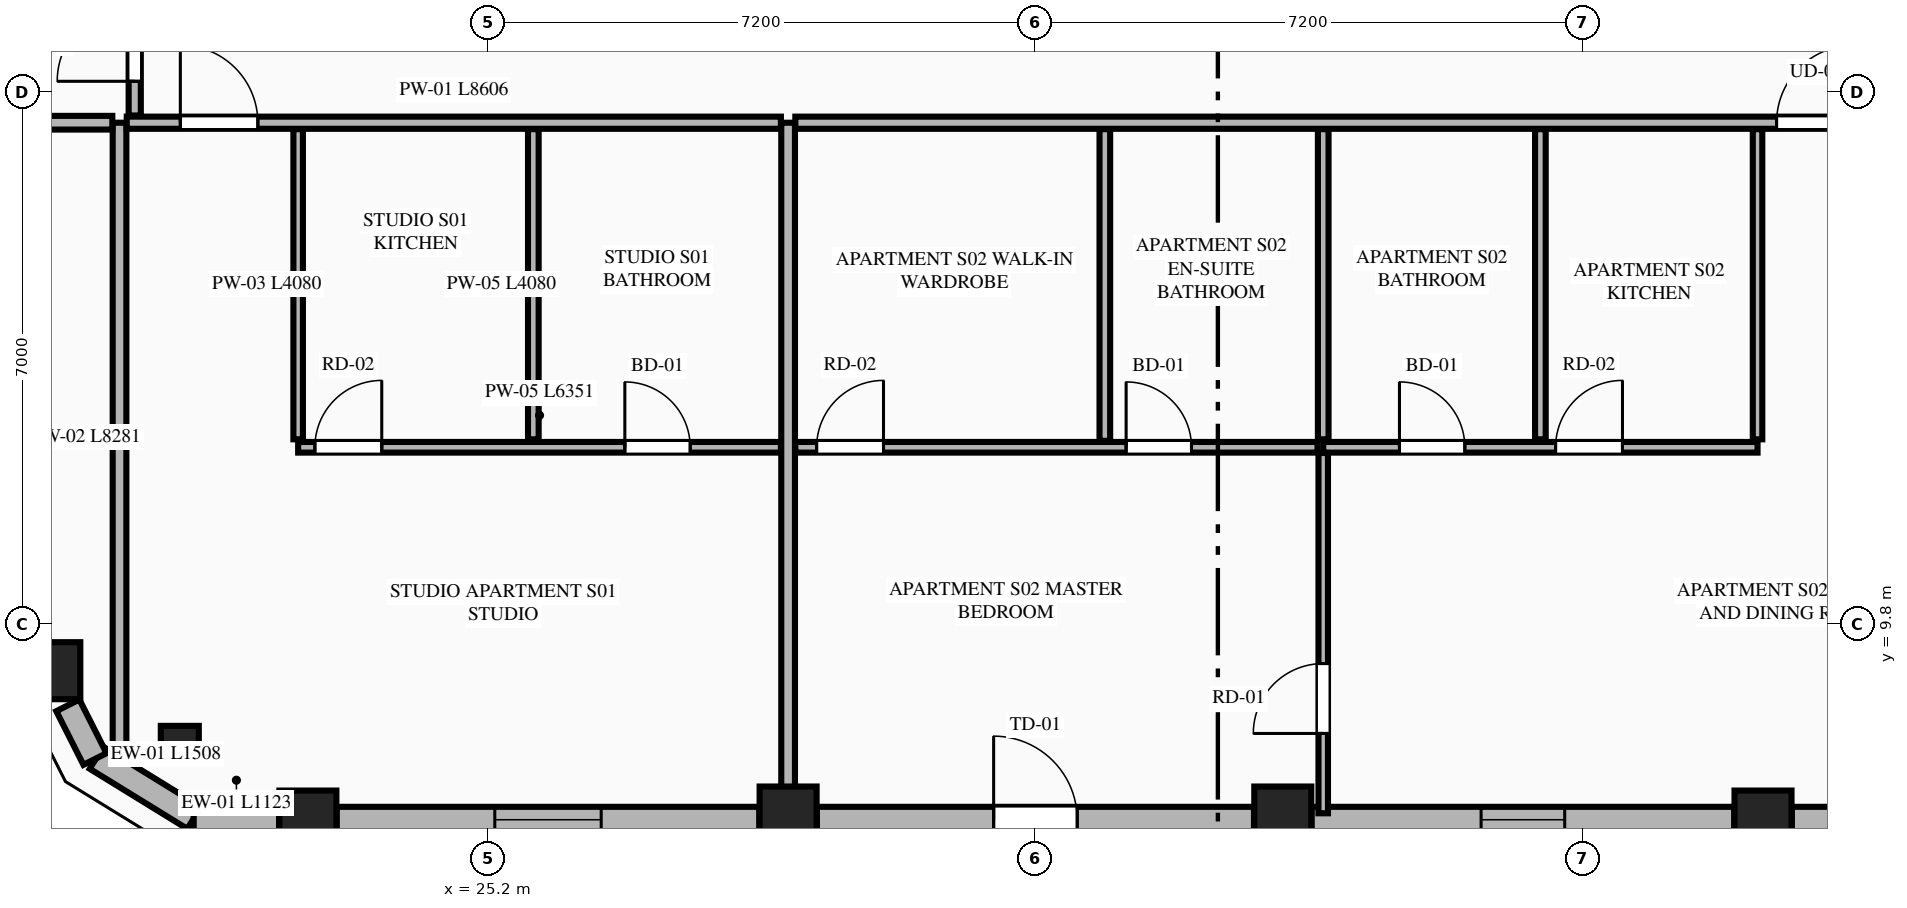
"""IFC4 building model, lengths in metres.
Left out: names, types, materials, properties, quantities, classifications, styles, units other than length and angle.
Written with IfcOpenShell. Run it as: python <this file> out.ifc"""

import sys

from ifc_helpers import new_model, si_unit, direction, frame, frame_2d, origin, origin_2d, place, context, subcontext, project, spatial, rectangle, extrude, element, fill, save


model = new_model("IFC4")
c1 = context("Model", 3, precision=1e-05, world=origin(), true_north=direction((0.0, 1.0)))
c2 = subcontext(c1, "Body", "Model", "MODEL_VIEW")
j1 = project(units=[si_unit("LENGTHUNIT", "METRE"), si_unit("PLANEANGLEUNIT", "RADIAN")], contexts=[c1])
p1 = place(None, origin())
s1 = spatial("IfcSite", under=j1, at=p1, CompositionType="ELEMENT")
p2 = place(p1, origin())
s2 = spatial("IfcBuilding", under=s1, at=p2, CompositionType="ELEMENT")
p3 = place(p2, frame((0.0, 0.0, 230.65)))
s3 = spatial("IfcBuildingStorey", under=s2, at=p3, CompositionType="ELEMENT", Elevation=230.65)
for number, where, z_axis, x_axis in (
    (1, (22.828, 7.239, 0.0), (0.0, 0.0, 1.0), (1.0, 0.0, 0.0)),
    (2, (29.146, 7.292, 0.0), (0.0, 0.0, 1.0), (1.0, 0.0, 0.0)),
    (3, (35.654, 7.292, 0.0), (0.0, 0.0, 1.0), (1.0, 0.0, 0.0)),
    (4, (41.972, 7.239, 0.0), (0.0, 0.0, 1.0), (1.0, 0.0, 0.0)),
    (5, (19.459, 9.191, 0.0), (0.0, 0.0, 1.0), (1.0, 0.0, 0.0)),
):
    element("IfcColumn", number, at=place(p3, frame(where, z_axis=z_axis, x_axis=x_axis)), inside=s3, PredefinedType="COLUMN", context=c2, shape_type="SweptSolid", body=[
        extrude(rectangle(XDim=0.75, YDim=0.75, at=origin_2d()), origin(), (0.0, 0.0, 1.0), 3.65),
    ])
p4 = place(p3, frame((21.143, 8.215, 0.0), z_axis=(0.0, 0.0, 1.0), x_axis=(0.865256437757, -0.501329529272, 0.0)))
e6 = element("IfcColumn", 6, at=p4, inside=s3, PredefinedType="PILASTER", context=c2, shape_type="SweptSolid", body=[
    extrude(rectangle(XDim=0.5, YDim=0.35, at=origin_2d()), origin(), (0.0, 0.0, 1.0), 3.65),
])
p5 = place(p3, frame((20.047, 8.045, 0.0), z_axis=(0.0, 0.0, 1.0), x_axis=(0.851680557619, -0.52406128246, 0.0)))
e7 = element("IfcWall", 7, at=p5, inside=s3, PredefinedType="STANDARD", context=c2, shape_type="SweptSolid", body=[
    extrude(rectangle(XDim=1.508, YDim=0.34, at=frame_2d((0.754, 0.0))), origin(), (0.0, 0.0, 1.0), 3.45),
])
p6 = place(p3, frame((21.326, 7.23, 0.0), z_axis=(0.0, 0.0, 1.0), x_axis=(1.0, 0.0, 0.0)))
e8 = element("IfcWall", 8, at=p6, inside=s3, PredefinedType="STANDARD", context=c2, shape_type="SweptSolid", body=[
    extrude(rectangle(XDim=1.123, YDim=0.34, at=frame_2d((0.562, 0.0))), origin(), (0.0, 0.0, 1.0), 3.45),
])
p7 = place(p3, frame((23.207, 7.23, 0.0), z_axis=(0.0, 0.0, 1.0), x_axis=(1.0, 0.0, 0.0)))
e9 = element("IfcWall", 9, at=p7, inside=s3, PredefinedType="STANDARD", context=c2, shape_type="SweptSolid", body=[
    extrude(rectangle(XDim=5.56, YDim=0.34, at=frame_2d((2.78, 0.0))), origin(), (0.0, 0.0, 1.0), 2.983),
])
p8 = place(p7, frame((2.08, 0.0, 0.75)))
e10 = element("IfcOpeningElement", 10, at=p8, cuts=e9, PredefinedType="OPENING", context=c2, shape_type="SweptSolid", body=[
    extrude(rectangle(XDim=1.4, YDim=2.05, at=frame_2d((0.7, 1.025))), frame((0.0, 0.18, 0.0), z_axis=(0.0, -1.0, 0.0), x_axis=(1.0, 0.0, 0.0)), (0.0, 0.0, 1.0), 0.36),
])
p9 = place(p3, frame((29.525, 7.23, 0.0), z_axis=(0.0, 0.0, 1.0), x_axis=(1.0, 0.0, 0.0)))
e11 = element("IfcWall", 11, at=p9, inside=s3, PredefinedType="STANDARD", context=c2, shape_type="SweptSolid", body=[
    extrude(rectangle(XDim=5.75, YDim=0.34, at=frame_2d((2.875, 0.0))), origin(), (0.0, 0.0, 1.0), 2.983),
])
p10 = place(p9, frame((2.325, 0.0, 0.0)))
e12 = element("IfcOpeningElement", 12, at=p10, cuts=e11, PredefinedType="OPENING", context=c2, shape_type="SweptSolid", body=[
    extrude(rectangle(XDim=1.1, YDim=2.25, at=frame_2d((0.55, 1.125))), frame((0.0, 0.18, 0.0), z_axis=(0.0, -1.0, 0.0), x_axis=(1.0, 0.0, 0.0)), (0.0, 0.0, 1.0), 0.36),
])
p11 = place(p3, frame((36.033, 7.23, 0.0), z_axis=(0.0, 0.0, 1.0), x_axis=(1.0, 0.0, 0.0)))
e13 = element("IfcWall", 13, at=p11, inside=s3, PredefinedType="STANDARD", context=c2, shape_type="SweptSolid", body=[
    extrude(rectangle(XDim=5.56, YDim=0.34, at=frame_2d((2.78, 0.0))), origin(), (0.0, 0.0, 1.0), 2.983),
])
p12 = place(p11, frame((2.23, 0.0, 0.75)))
e14 = element("IfcOpeningElement", 14, at=p12, cuts=e13, PredefinedType="OPENING", context=c2, shape_type="SweptSolid", body=[
    extrude(rectangle(XDim=1.1, YDim=2.0, at=frame_2d((0.55, 1.0))), frame((0.0, 0.18, 0.0), z_axis=(0.0, -1.0, 0.0), x_axis=(1.0, 0.0, 0.0)), (0.0, 0.0, 1.0), 0.36),
])
p13 = place(p3, frame((42.351, 7.23, 0.0), z_axis=(0.0, 0.0, 1.0), x_axis=(1.0, 0.0, 0.0)))
e15 = element("IfcWall", 15, at=p13, inside=s3, PredefinedType="STANDARD", context=c2, shape_type="SweptSolid", body=[
    extrude(rectangle(XDim=1.123, YDim=0.34, at=frame_2d((0.562, 0.0))), origin(), (0.0, 0.0, 1.0), 3.45),
])
p14 = place(p3, frame((19.67, 8.735, 0.0), z_axis=(0.0, 0.0, 1.0), x_axis=(0.451404919072, -0.89231922485, 0.0)))
e16 = element("IfcWall", 16, at=p14, inside=s3, PredefinedType="STANDARD", context=c2, shape_type="SweptSolid", body=[
    extrude(rectangle(XDim=0.791, YDim=0.34, at=frame_2d((0.396, 0.0))), origin(), (0.0, 0.0, 1.0), 3.45),
])
p15 = place(p3, frame((20.35, 8.119, 0.0), z_axis=(0.0, 0.0, 1.0), x_axis=(0.0, 1.0, 0.0)))
e17 = element("IfcWall", 17, at=p15, inside=s3, PredefinedType="PARTITIONING", context=c2, shape_type="SweptSolid", body=[
    extrude(rectangle(XDim=8.281, YDim=0.18, at=frame_2d((4.141, 0.0))), origin(), (0.0, 0.0, 1.0), 3.45),
])
p16 = place(p3, frame((29.146, 7.405, 0.0), z_axis=(0.0, 0.0, 1.0), x_axis=(0.0, 1.0, 0.0)))
e18 = element("IfcWall", 18, at=p16, inside=s3, PredefinedType="PARTITIONING", context=c2, shape_type="SweptSolid", body=[
    extrude(rectangle(XDim=8.995, YDim=0.18, at=frame_2d((4.498, 0.0))), origin(), (0.0, 0.0, 1.0), 2.907),
])
p17 = place(p3, frame((20.445, 16.4, 0.0), z_axis=(0.0, 0.0, 1.0), x_axis=(1.0, 0.0, 0.0)))
e19 = element("IfcWall", 19, at=p17, inside=s3, PredefinedType="PARTITIONING", context=c2, shape_type="SweptSolid", body=[
    extrude(rectangle(XDim=8.606, YDim=0.16, at=frame_2d((4.303, 0.0))), origin(), (0.0, 0.0, 1.0), 3.45),
])
p18 = place(p17, frame((0.705, 0.0, 0.0)))
e20 = element("IfcOpeningElement", 20, at=p18, cuts=e19, PredefinedType="OPENING", context=c2, shape_type="SweptSolid", body=[
    extrude(rectangle(XDim=1.02, YDim=2.25, at=frame_2d((0.51, 1.125))), frame((0.0, 0.09, 0.0), z_axis=(0.0, -1.0, 0.0), x_axis=(1.0, 0.0, 0.0)), (0.0, 0.0, 1.0), 0.18),
])
p19 = place(p3, frame((22.7, 12.235, 0.0), z_axis=(0.0, 0.0, 1.0), x_axis=(0.0, 1.0, 0.0)))
e21 = element("IfcWall", 21, at=p19, inside=s3, PredefinedType="PARTITIONING", context=c2, shape_type="SweptSolid", body=[
    extrude(rectangle(XDim=4.08, YDim=0.125, at=frame_2d((2.04, 0.0))), origin(), (0.0, 0.0, 1.0), 2.907),
])
p20 = place(p3, frame((22.7, 12.13, 0.0), z_axis=(0.0, 0.0, 1.0), x_axis=(1.0, 0.0, 0.0)))
e22 = element("IfcWall", 22, at=p20, inside=s3, PredefinedType="PLUMBINGWALL", context=c2, shape_type="SweptSolid", body=[
    extrude(rectangle(XDim=6.351, YDim=0.14, at=frame_2d((3.176, 0.0))), origin(), (0.0, 0.0, 1.0), 3.45),
])
p21 = place(p20, frame((4.298, 0.0, 0.0)))
e23 = element("IfcOpeningElement", 23, at=p21, cuts=e22, PredefinedType="OPENING", context=c2, shape_type="SweptSolid", body=[
    extrude(rectangle(XDim=0.86, YDim=2.1, at=frame_2d((0.43, 1.05))), frame((0.0, 0.08, 0.0), z_axis=(0.0, -1.0, 0.0), x_axis=(1.0, 0.0, 0.0)), (0.0, 0.0, 1.0), 0.16),
])
p22 = place(p20, frame((0.22, 0.0, 0.0)))
e24 = element("IfcOpeningElement", 24, at=p22, cuts=e22, PredefinedType="OPENING", context=c2, shape_type="SweptSolid", body=[
    extrude(rectangle(XDim=0.88, YDim=2.15, at=frame_2d((0.44, 1.075))), frame((0.0, 0.08, 0.0), z_axis=(0.0, -1.0, 0.0), x_axis=(1.0, 0.0, 0.0)), (0.0, 0.0, 1.0), 0.16),
])
p23 = place(p3, frame((25.794, 12.235, 0.0), z_axis=(0.0, 0.0, 1.0), x_axis=(0.0, 1.0, 0.0)))
e25 = element("IfcWall", 25, at=p23, inside=s3, PredefinedType="PLUMBINGWALL", context=c2, shape_type="SweptSolid", body=[
    extrude(rectangle(XDim=4.08, YDim=0.14, at=frame_2d((2.04, 0.0))), origin(), (0.0, 0.0, 1.0), 3.45),
])
p24 = place(p3, frame((29.241, 16.4, 0.0), z_axis=(0.0, 0.0, 1.0), x_axis=(1.0, 0.0, 0.0)))
e26 = element("IfcWall", 26, at=p24, inside=s3, PredefinedType="PARTITIONING", context=c2, shape_type="SweptSolid", body=[
    extrude(rectangle(XDim=15.114, YDim=0.16, at=frame_2d((7.557, 0.0))), origin(), (0.0, 0.0, 1.0), 3.45),
])
p25 = place(p24, frame((12.909, 0.0, 0.0)))
e27 = element("IfcOpeningElement", 27, at=p25, cuts=e26, PredefinedType="OPENING", context=c2, shape_type="SweptSolid", body=[
    extrude(rectangle(XDim=1.02, YDim=2.25, at=frame_2d((0.51, 1.125))), frame((0.0, 0.09, 0.0), z_axis=(0.0, -1.0, 0.0), x_axis=(1.0, 0.0, 0.0)), (0.0, 0.0, 1.0), 0.18),
])
p26 = place(p3, frame((41.9, 12.235, 0.0), z_axis=(0.0, 0.0, 1.0), x_axis=(0.0, 1.0, 0.0)))
e28 = element("IfcWall", 28, at=p26, inside=s3, PredefinedType="PARTITIONING", context=c2, shape_type="SweptSolid", body=[
    extrude(rectangle(XDim=4.08, YDim=0.125, at=frame_2d((2.04, 0.0))), origin(), (0.0, 0.0, 1.0), 2.907),
])
p27 = place(p3, frame((36.186, 12.13, 0.0), z_axis=(0.0, 0.0, 1.0), x_axis=(1.0, 0.0, 0.0)))
e29 = element("IfcWall", 29, at=p27, inside=s3, PredefinedType="PLUMBINGWALL", context=c2, shape_type="SweptSolid", body=[
    extrude(rectangle(XDim=5.714, YDim=0.14, at=frame_2d((2.857, 0.0))), origin(), (0.0, 0.0, 1.0), 3.45),
])
p28 = place(p27, frame((1.003, 0.0, 0.0)))
e30 = element("IfcOpeningElement", 30, at=p28, cuts=e29, PredefinedType="OPENING", context=c2, shape_type="SweptSolid", body=[
    extrude(rectangle(XDim=0.86, YDim=2.1, at=frame_2d((0.43, 1.05))), frame((0.0, 0.08, 0.0), z_axis=(0.0, -1.0, 0.0), x_axis=(1.0, 0.0, 0.0)), (0.0, 0.0, 1.0), 0.16),
])
p29 = place(p27, frame((3.057, 0.0, 0.0)))
e31 = element("IfcOpeningElement", 31, at=p29, cuts=e29, PredefinedType="OPENING", context=c2, shape_type="SweptSolid", body=[
    extrude(rectangle(XDim=0.88, YDim=2.15, at=frame_2d((0.44, 1.075))), frame((0.0, 0.08, 0.0), z_axis=(0.0, -1.0, 0.0), x_axis=(1.0, 0.0, 0.0)), (0.0, 0.0, 1.0), 0.16),
])
p30 = place(p3, frame((29.241, 12.13, 0.0), z_axis=(0.0, 0.0, 1.0), x_axis=(1.0, 0.0, 0.0)))
e32 = element("IfcWall", 32, at=p30, inside=s3, PredefinedType="PLUMBINGWALL", context=c2, shape_type="SweptSolid", body=[
    extrude(rectangle(XDim=6.87, YDim=0.14, at=frame_2d((3.435, 0.0))), origin(), (0.0, 0.0, 1.0), 3.45),
])
p31 = place(p30, frame((0.28, 0.0, 0.0)))
e33 = element("IfcOpeningElement", 33, at=p31, cuts=e32, PredefinedType="OPENING", context=c2, shape_type="SweptSolid", body=[
    extrude(rectangle(XDim=0.88, YDim=2.15, at=frame_2d((0.44, 1.075))), frame((0.0, 0.08, 0.0), z_axis=(0.0, -1.0, 0.0), x_axis=(1.0, 0.0, 0.0)), (0.0, 0.0, 1.0), 0.16),
])
p32 = place(p30, frame((4.352, 0.0, 0.0)))
e34 = element("IfcOpeningElement", 34, at=p32, cuts=e32, PredefinedType="OPENING", context=c2, shape_type="SweptSolid", body=[
    extrude(rectangle(XDim=0.86, YDim=2.1, at=frame_2d((0.43, 1.05))), frame((0.0, 0.08, 0.0), z_axis=(0.0, -1.0, 0.0), x_axis=(1.0, 0.0, 0.0)), (0.0, 0.0, 1.0), 0.16),
])
for number, where, z_axis, x_axis in (
    (35, (39.043, 12.235, 0.0), (0.0, 0.0, 1.0), (0.0, 1.0, 0.0)),
    (36, (36.186, 12.235, 0.0), (0.0, 0.0, 1.0), (0.0, 1.0, 0.0)),
):
    element("IfcWall", number, at=place(p3, frame(where, z_axis=z_axis, x_axis=x_axis)), inside=s3, PredefinedType="PLUMBINGWALL", context=c2, shape_type="SweptSolid", body=[
        extrude(rectangle(XDim=4.08, YDim=0.14, at=frame_2d((2.04, 0.0))), origin(), (0.0, 0.0, 1.0), 3.45),
    ])
p33 = place(p3, frame((36.186, 7.315, 0.0), z_axis=(0.0, 0.0, 1.0), x_axis=(0.0, 1.0, 0.0)))
e37 = element("IfcWall", 37, at=p33, inside=s3, PredefinedType="PARTITIONING", context=c2, shape_type="SweptSolid", body=[
    extrude(rectangle(XDim=4.74, YDim=0.125, at=frame_2d((2.37, 0.0))), origin(), (0.0, 0.0, 1.0), 3.45),
])
p34 = place(p33, frame((1.05, 0.0, 0.0)))
e38 = element("IfcOpeningElement", 38, at=p34, cuts=e37, PredefinedType="OPENING", context=c2, shape_type="SweptSolid", body=[
    extrude(rectangle(XDim=0.92, YDim=2.15, at=frame_2d((0.46, 1.075))), frame((0.0, 0.073, 0.0), z_axis=(0.0, -1.0, 0.0), x_axis=(1.0, 0.0, 0.0)), (0.0, 0.0, 1.0), 0.145),
])
p35 = place(p3, frame((33.313, 12.215, 0.0), z_axis=(0.0, 0.0, 1.0), x_axis=(0.0, 1.0, 0.0)))
e39 = element("IfcWall", 39, at=p35, inside=s3, PredefinedType="PLUMBINGWALL", context=c2, shape_type="SweptSolid", body=[
    extrude(rectangle(XDim=4.1, YDim=0.14, at=frame_2d((2.05, 0.0))), origin(), (0.0, 0.0, 1.0), 3.45),
])
p36 = place(p3, frame((16.034, 16.4, 0.0), z_axis=(0.0, 0.0, 1.0), x_axis=(1.0, 0.0, 0.0)))
e40 = element("IfcWall", 40, at=p36, inside=s3, PredefinedType="PARTITIONING", context=c2, shape_type="SweptSolid", body=[
    extrude(rectangle(XDim=4.221, YDim=0.18, at=frame_2d((2.11, 0.0))), origin(), (0.0, 0.0, 1.0), 3.45),
])
p37 = place(p3, frame((20.55, 16.495, 0.0), z_axis=(0.0, 0.0, 1.0), x_axis=(0.0, 1.0, 0.0)))
e41 = element("IfcWall", 41, at=p37, inside=s3, PredefinedType="PARTITIONING", context=c2, shape_type="SweptSolid", body=[
    extrude(rectangle(XDim=18.41, YDim=0.16, at=frame_2d((9.205, 0.0))), origin(), (0.0, 0.0, 1.0), 3.137),
])
p38 = place(p37, frame((0.45, 0.0, 0.0)))
e42 = element("IfcOpeningElement", 42, at=p38, cuts=e41, PredefinedType="OPENING", context=c2, shape_type="SweptSolid", body=[
    extrude(rectangle(XDim=1.02, YDim=2.25, at=frame_2d((0.51, 1.125))), frame((0.0, 0.09, 0.0), z_axis=(0.0, -1.0, 0.0), x_axis=(1.0, 0.0, 0.0)), (0.0, 0.0, 1.0), 0.18),
])
p39 = place(p8, origin())
e43 = element("IfcWindow", 43, at=p39, inside=s3, PartitioningType="SINGLE_PANEL", PredefinedType="WINDOW", context=c2, shape_type="SweptSolid", body=[
    extrude(rectangle(XDim=1.4, YDim=2.05, at=frame_2d((0.7, 1.025))), frame((0.0, 0.03, 0.0), z_axis=(0.0, -1.0, 0.0), x_axis=(1.0, 0.0, 0.0)), (0.0, 0.0, 1.0), 0.06),
])
fill(e10, e43)
p40 = place(p10, origin())
e44 = element("IfcDoor", 44, at=p40, inside=s3, OperationType="SINGLE_SWING_LEFT", PredefinedType="DOOR", context=c2, shape_type="SweptSolid", body=[
    extrude(rectangle(XDim=1.1, YDim=2.25, at=frame_2d((0.55, 1.125))), frame((0.0, 0.025, 0.0), z_axis=(0.0, -1.0, 0.0), x_axis=(1.0, 0.0, 0.0)), (0.0, 0.0, 1.0), 0.05),
])
fill(e12, e44)
p41 = place(p12, origin())
e45 = element("IfcWindow", 45, at=p41, inside=s3, PartitioningType="SINGLE_PANEL", PredefinedType="WINDOW", context=c2, shape_type="SweptSolid", body=[
    extrude(rectangle(XDim=1.1, YDim=2.0, at=frame_2d((0.55, 1.0))), frame((0.0, 0.03, 0.0), z_axis=(0.0, -1.0, 0.0), x_axis=(1.0, 0.0, 0.0)), (0.0, 0.0, 1.0), 0.06),
])
fill(e14, e45)
p42 = place(p21, origin())
e46 = element("IfcDoor", 46, at=p42, inside=s3, OperationType="SINGLE_SWING_LEFT", PredefinedType="DOOR", context=c2, shape_type="SweptSolid", body=[
    extrude(rectangle(XDim=0.86, YDim=2.1, at=frame_2d((0.43, 1.05))), frame((0.0, 0.025, 0.0), z_axis=(0.0, -1.0, 0.0), x_axis=(1.0, 0.0, 0.0)), (0.0, 0.0, 1.0), 0.05),
])
fill(e23, e46)
p43 = place(p18, origin())
e47 = element("IfcDoor", 47, at=p43, inside=s3, OperationType="SINGLE_SWING_LEFT", PredefinedType="DOOR", context=c2, shape_type="SweptSolid", body=[
    extrude(rectangle(XDim=1.02, YDim=2.25, at=frame_2d((0.51, 1.125))), frame((0.0, 0.025, 0.0), z_axis=(0.0, -1.0, 0.0), x_axis=(1.0, 0.0, 0.0)), (0.0, 0.0, 1.0), 0.05),
])
fill(e20, e47)
p44 = place(p22, origin())
e48 = element("IfcDoor", 48, at=p44, inside=s3, OperationType="SINGLE_SWING_RIGHT", PredefinedType="DOOR", context=c2, shape_type="SweptSolid", body=[
    extrude(rectangle(XDim=0.88, YDim=2.15, at=frame_2d((0.44, 1.075))), frame((0.0, 0.025, 0.0), z_axis=(0.0, -1.0, 0.0), x_axis=(1.0, 0.0, 0.0)), (0.0, 0.0, 1.0), 0.05),
])
fill(e24, e48)
p45 = place(p28, origin())
e49 = element("IfcDoor", 49, at=p45, inside=s3, OperationType="SINGLE_SWING_LEFT", PredefinedType="DOOR", context=c2, shape_type="SweptSolid", body=[
    extrude(rectangle(XDim=0.86, YDim=2.1, at=frame_2d((0.43, 1.05))), frame((0.0, 0.025, 0.0), z_axis=(0.0, -1.0, 0.0), x_axis=(1.0, 0.0, 0.0)), (0.0, 0.0, 1.0), 0.05),
])
fill(e30, e49)
p46 = place(p31, origin())
e50 = element("IfcDoor", 50, at=p46, inside=s3, OperationType="SINGLE_SWING_RIGHT", PredefinedType="DOOR", context=c2, shape_type="SweptSolid", body=[
    extrude(rectangle(XDim=0.88, YDim=2.15, at=frame_2d((0.44, 1.075))), frame((0.0, 0.025, 0.0), z_axis=(0.0, -1.0, 0.0), x_axis=(1.0, 0.0, 0.0)), (0.0, 0.0, 1.0), 0.05),
])
fill(e33, e50)
p47 = place(p32, origin())
e51 = element("IfcDoor", 51, at=p47, inside=s3, OperationType="SINGLE_SWING_LEFT", PredefinedType="DOOR", context=c2, shape_type="SweptSolid", body=[
    extrude(rectangle(XDim=0.86, YDim=2.1, at=frame_2d((0.43, 1.05))), frame((0.0, 0.025, 0.0), z_axis=(0.0, -1.0, 0.0), x_axis=(1.0, 0.0, 0.0)), (0.0, 0.0, 1.0), 0.05),
])
fill(e34, e51)
p48 = place(p25, origin())
e52 = element("IfcDoor", 52, at=p48, inside=s3, OperationType="SINGLE_SWING_RIGHT", PredefinedType="DOOR", context=c2, shape_type="SweptSolid", body=[
    extrude(rectangle(XDim=1.02, YDim=2.25, at=frame_2d((0.51, 1.125))), frame((0.0, 0.025, 0.0), z_axis=(0.0, -1.0, 0.0), x_axis=(1.0, 0.0, 0.0)), (0.0, 0.0, 1.0), 0.05),
])
fill(e27, e52)
p49 = place(p29, origin())
e53 = element("IfcDoor", 53, at=p49, inside=s3, OperationType="SINGLE_SWING_RIGHT", PredefinedType="DOOR", context=c2, shape_type="SweptSolid", body=[
    extrude(rectangle(XDim=0.88, YDim=2.15, at=frame_2d((0.44, 1.075))), frame((0.0, 0.025, 0.0), z_axis=(0.0, -1.0, 0.0), x_axis=(1.0, 0.0, 0.0)), (0.0, 0.0, 1.0), 0.05),
])
fill(e31, e53)
p50 = place(p34, origin())
e54 = element("IfcDoor", 54, at=p50, inside=s3, OperationType="SINGLE_SWING_LEFT", PredefinedType="DOOR", context=c2, shape_type="SweptSolid", body=[
    extrude(rectangle(XDim=0.92, YDim=2.15, at=frame_2d((0.46, 1.075))), frame((0.0, 0.025, 0.0), z_axis=(0.0, -1.0, 0.0), x_axis=(1.0, 0.0, 0.0)), (0.0, 0.0, 1.0), 0.05),
])
fill(e38, e54)
p51 = place(p38, origin())
e55 = element("IfcDoor", 55, at=p51, inside=s3, OperationType="SINGLE_SWING_LEFT", PredefinedType="DOOR", context=c2, shape_type="SweptSolid", body=[
    extrude(rectangle(XDim=1.02, YDim=2.25, at=frame_2d((0.51, 1.125))), frame((0.0, 0.025, 0.0), z_axis=(0.0, -1.0, 0.0), x_axis=(1.0, 0.0, 0.0)), (0.0, 0.0, 1.0), 0.05),
])
fill(e42, e55)
save(model, sys.argv[1])
